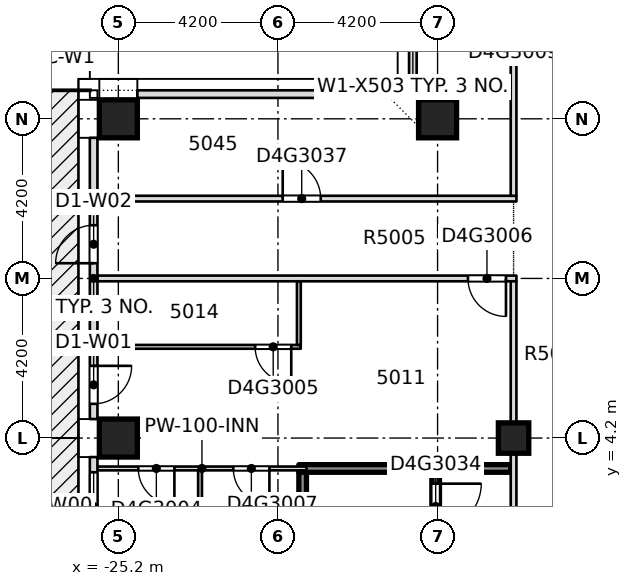
"""IFC4 building model, lengths in metres.
Left out: names, types, materials, properties, quantities, classifications, styles, units other than length and angle.
Written with IfcOpenShell. Run it as: python <this file> out.ifc"""

import sys

from ifc_helpers import new_model, si_unit, direction, frame, frame_2d, origin, origin_2d, place, context, subcontext, project, spatial, rectangle, extrude, element, fill, save


model = new_model("IFC4")
c1 = context("Model", 3, precision=1e-05, world=origin(), true_north=direction((0.0, 1.0)))
c2 = subcontext(c1, "Body", "Model", "MODEL_VIEW")
j1 = project(units=[si_unit("LENGTHUNIT", "METRE"), si_unit("PLANEANGLEUNIT", "RADIAN")], contexts=[c1])
p1 = place(None, origin())
s1 = spatial("IfcSite", under=j1, at=p1, CompositionType="ELEMENT")
p2 = place(p1, origin())
s2 = spatial("IfcBuilding", under=s1, at=p2, CompositionType="ELEMENT")
p3 = place(p2, frame((0.0, 0.0, 192.8)))
s3 = spatial("IfcBuildingStorey", under=s2, at=p3, CompositionType="ELEMENT", Elevation=192.8)
for number, where, z_axis, x_axis in (
    (1, (-25.2, 4.2, -0.4), (0.0, 0.0, 1.0), (1.0, 0.0, 0.0)),
    (2, (-25.2, 12.6, -0.4), (0.0, 0.0, 1.0), (1.0, 0.0, 0.0)),
    (3, (-16.8, 12.6, -0.4), (0.0, 0.0, 1.0), (1.0, 0.0, 0.0)),
):
    element("IfcColumn", number, at=place(p3, frame(where, z_axis=z_axis, x_axis=x_axis)), inside=s3, PredefinedType="COLUMN", context=c2, shape_type="SweptSolid", body=[
        extrude(rectangle(XDim=1.0, YDim=1.0, at=origin_2d()), origin(), (0.0, 0.0, 1.0), 3.45),
    ])
p4 = place(p3, frame((-14.8, 4.2, -0.4), z_axis=(0.0, 0.0, 1.0), x_axis=(1.0, 0.0, 0.0)))
e4 = element("IfcColumn", 4, at=p4, inside=s3, PredefinedType="COLUMN", context=c2, shape_type="SweptSolid", body=[
    extrude(rectangle(XDim=0.8, YDim=0.8, at=origin_2d()), origin(), (0.0, 0.0, 1.0), 3.45),
])
p5 = place(p3, frame((-25.75, 3.4, 0.0), z_axis=(0.0, 0.0, 1.0), x_axis=(1.0, 0.0, 0.0)))
e5 = element("IfcWall", 5, at=p5, inside=s3, PredefinedType="PARTITIONING", context=c2, shape_type="SweptSolid", body=[
    extrude(rectangle(XDim=5.5, YDim=0.1, at=frame_2d((2.75, 0.0))), origin(), (0.0, 0.0, 1.0), 3.05),
])
p6 = place(p5, frame((1.075, 0.0, 0.0)))
e6 = element("IfcOpeningElement", 6, at=p6, cuts=e5, PredefinedType="OPENING", context=c2, shape_type="SweptSolid", body=[
    extrude(rectangle(XDim=0.95, YDim=2.1, at=frame_2d((0.475, 1.05))), frame((0.0, 0.06, 0.0), z_axis=(0.0, -1.0, 0.0), x_axis=(1.0, 0.0, 0.0)), (0.0, 0.0, 1.0), 0.12),
])
p7 = place(p5, frame((3.575, 0.0, 0.0)))
e7 = element("IfcOpeningElement", 7, at=p7, cuts=e5, PredefinedType="OPENING", context=c2, shape_type="SweptSolid", body=[
    extrude(rectangle(XDim=0.95, YDim=2.1, at=frame_2d((0.475, 1.05))), frame((0.0, 0.06, 0.0), z_axis=(0.0, -1.0, 0.0), x_axis=(1.0, 0.0, 0.0)), (0.0, 0.0, 1.0), 0.12),
])
p8 = place(p3, frame((-20.45, 3.4, 0.0), z_axis=(0.0, 0.0, 1.0), x_axis=(1.0, 0.0, 0.0)))
e8 = element("IfcWall", 8, at=p8, inside=s3, PredefinedType="SOLIDWALL", context=c2, shape_type="SweptSolid", body=[
    extrude(rectangle(XDim=5.575, YDim=0.2, at=frame_2d((2.788, 0.0))), origin(), (0.0, 0.0, 1.0), 3.05),
])
p9 = place(p3, frame((-25.75, 6.6, 0.0), z_axis=(0.0, 0.0, 1.0), x_axis=(1.0, 0.0, 0.0)))
e9 = element("IfcWall", 9, at=p9, inside=s3, PredefinedType="PARTITIONING", context=c2, shape_type="SweptSolid", body=[
    extrude(rectangle(XDim=5.35, YDim=0.1, at=frame_2d((2.675, 0.0))), origin(), (0.0, 0.0, 1.0), 3.05),
])
p10 = place(p9, frame((4.15, 0.0, 0.0)))
e10 = element("IfcOpeningElement", 10, at=p10, cuts=e9, PredefinedType="OPENING", context=c2, shape_type="SweptSolid", body=[
    extrude(rectangle(XDim=0.95, YDim=2.1, at=frame_2d((0.475, 1.05))), frame((0.0, 0.06, 0.0), z_axis=(0.0, -1.0, 0.0), x_axis=(1.0, 0.0, 0.0)), (0.0, 0.0, 1.0), 0.12),
])
p11 = place(p3, frame((-25.75, 8.4, 0.0), z_axis=(0.0, 0.0, 1.0), x_axis=(1.0, 0.0, 0.0)))
e11 = element("IfcWall", 11, at=p11, inside=s3, PredefinedType="PARTITIONING", context=c2, shape_type="SweptSolid", body=[
    extrude(rectangle(XDim=11.025, YDim=0.15, at=frame_2d((5.512, 0.0))), origin(), (0.0, 0.0, 1.0), 3.05),
])
p12 = place(p11, frame((9.75, 0.0, 0.0)))
e12 = element("IfcOpeningElement", 12, at=p12, cuts=e11, PredefinedType="OPENING", context=c2, shape_type="SweptSolid", body=[
    extrude(rectangle(XDim=1.0, YDim=2.1, at=frame_2d((0.5, 1.05))), frame((0.0, 0.085, 0.0), z_axis=(0.0, -1.0, 0.0), x_axis=(1.0, 0.0, 0.0)), (0.0, 0.0, 1.0), 0.17),
])
p13 = place(p3, frame((-25.75, 10.5, 0.0), z_axis=(0.0, 0.0, 1.0), x_axis=(1.0, 0.0, 0.0)))
e13 = element("IfcWall", 13, at=p13, inside=s3, PredefinedType="PARTITIONING", context=c2, shape_type="SweptSolid", body=[
    extrude(rectangle(XDim=11.025, YDim=0.15, at=frame_2d((5.512, 0.0))), origin(), (0.0, 0.0, 1.0), 3.05),
])
p14 = place(p13, frame((4.875, 0.0, 0.0)))
e14 = element("IfcOpeningElement", 14, at=p14, cuts=e13, PredefinedType="OPENING", context=c2, shape_type="SweptSolid", body=[
    extrude(rectangle(XDim=1.0, YDim=2.1, at=frame_2d((0.5, 1.05))), frame((0.0, 0.085, 0.0), z_axis=(0.0, -1.0, 0.0), x_axis=(1.0, 0.0, 0.0)), (0.0, 0.0, 1.0), 0.17),
])
p15 = place(p3, frame((-17.35, 13.35, 0.0), z_axis=(0.0, 0.0, 1.0), x_axis=(1.0, 0.0, 0.0)))
e15 = element("IfcWall", 15, at=p15, inside=s3, PredefinedType="PARTITIONING", context=c2, shape_type="SweptSolid", body=[
    extrude(rectangle(XDim=2.475, YDim=0.2, at=frame_2d((1.238, 0.0))), origin(), (0.0, 0.0, 1.0), 3.05),
])
p16 = place(p3, frame((-23.05, -3.3, 0.0), z_axis=(0.0, 0.0, 1.0), x_axis=(0.0, 1.0, 0.0)))
e16 = element("IfcWall", 16, at=p16, inside=s3, PredefinedType="PARTITIONING", context=c2, shape_type="SweptSolid", body=[
    extrude(rectangle(XDim=6.65, YDim=0.1, at=frame_2d((3.325, 0.0))), origin(), (0.0, 0.0, 1.0), 3.05),
])
p17 = place(p3, frame((-20.45, 6.65, 0.0), z_axis=(0.0, 0.0, 1.0), x_axis=(0.0, 1.0, 0.0)))
e17 = element("IfcWall", 17, at=p17, inside=s3, PredefinedType="PARTITIONING", context=c2, shape_type="SweptSolid", body=[
    extrude(rectangle(XDim=1.675, YDim=0.1, at=frame_2d((0.837, 0.0))), origin(), (0.0, 0.0, 1.0), 3.05),
])
p18 = place(p3, frame((-20.35, -0.83, 0.0), z_axis=(0.0, 0.0, 1.0), x_axis=(0.0, 1.0, 0.0)))
e18 = element("IfcWall", 18, at=p18, inside=s3, PredefinedType="SOLIDWALL", context=c2, shape_type="SweptSolid", body=[
    extrude(rectangle(XDim=4.13, YDim=0.2, at=frame_2d((2.065, 0.0))), origin(), (0.0, 0.0, 1.0), 3.05),
])
p19 = place(p3, frame((-16.85, -3.35, 0.0), z_axis=(0.0, 0.0, 1.0), x_axis=(0.0, 1.0, 0.0)))
e19 = element("IfcWall", 19, at=p19, inside=s3, PredefinedType="SOLIDWALL", context=c2, shape_type="SweptSolid", body=[
    extrude(rectangle(XDim=6.65, YDim=0.2, at=frame_2d((3.325, 0.0))), origin(), (0.0, 0.0, 1.0), 3.05),
])
p20 = place(p19, frame((5.15, 0.0, 0.0)))
e20 = element("IfcOpeningElement", 20, at=p20, cuts=e19, PredefinedType="OPENING", context=c2, shape_type="SweptSolid", body=[
    extrude(rectangle(XDim=1.2, YDim=2.1, at=frame_2d((0.6, 1.05))), frame((0.0, 0.11, 0.0), z_axis=(0.0, -1.0, 0.0), x_axis=(1.0, 0.0, 0.0)), (0.0, 0.0, 1.0), 0.22),
])
p21 = place(p3, frame((-14.8, -3.35, 0.0), z_axis=(0.0, 0.0, 1.0), x_axis=(0.0, 1.0, 0.0)))
e21 = element("IfcWall", 21, at=p21, inside=s3, PredefinedType="PARTITIONING", context=c2, shape_type="SweptSolid", body=[
    extrude(rectangle(XDim=11.675, YDim=0.15, at=frame_2d((5.837, 0.0))), origin(), (0.0, 0.0, 1.0), 3.05),
])
p22 = place(p21, frame((2.8, 0.0, 0.0)))
e22 = element("IfcOpeningElement", 22, at=p22, cuts=e21, PredefinedType="OPENING", context=c2, shape_type="SweptSolid", body=[
    extrude(rectangle(XDim=1.1, YDim=2.1, at=frame_2d((0.55, 1.05))), frame((0.0, 0.085, 0.0), z_axis=(0.0, -1.0, 0.0), x_axis=(1.0, 0.0, 0.0)), (0.0, 0.0, 1.0), 0.17),
])
p23 = place(p3, frame((-14.8, 10.575, 0.0), z_axis=(0.0, 0.0, 1.0), x_axis=(0.0, 1.0, 0.0)))
e23 = element("IfcWall", 23, at=p23, inside=s3, PredefinedType="PARTITIONING", context=c2, shape_type="SweptSolid", body=[
    extrude(rectangle(XDim=10.975, YDim=0.15, at=frame_2d((5.488, 0.0))), origin(), (0.0, 0.0, 1.0), 3.05),
])
p24 = place(p23, frame((4.375, 0.0, 0.0)))
e24 = element("IfcOpeningElement", 24, at=p24, cuts=e23, PredefinedType="OPENING", context=c2, shape_type="SweptSolid", body=[
    extrude(rectangle(XDim=0.95, YDim=2.1, at=frame_2d((0.475, 1.05))), frame((0.0, 0.085, 0.0), z_axis=(0.0, -1.0, 0.0), x_axis=(1.0, 0.0, 0.0)), (0.0, 0.0, 1.0), 0.17),
])
p25 = place(p23, frame((8.275, 0.0, 0.0)))
e25 = element("IfcOpeningElement", 25, at=p25, cuts=e23, PredefinedType="OPENING", context=c2, shape_type="SweptSolid", body=[
    extrude(rectangle(XDim=0.95, YDim=2.1, at=frame_2d((0.475, 1.05))), frame((0.0, 0.085, 0.0), z_axis=(0.0, -1.0, 0.0), x_axis=(1.0, 0.0, 0.0)), (0.0, 0.0, 1.0), 0.17),
])
p26 = place(p3, frame((-17.45, 20.5, 0.0), z_axis=(0.0, 0.0, 1.0), x_axis=(0.0, -1.0, 0.0)))
e26 = element("IfcWall", 26, at=p26, inside=s3, PredefinedType="STANDARD", context=c2, shape_type="SweptSolid", body=[
    extrude(rectangle(XDim=7.15, YDim=0.2, at=frame_2d((3.575, 0.0))), origin(), (0.0, 0.0, 1.0), 3.05),
])
p27 = place(p26, frame((3.975, 0.0, 0.2)))
e27 = element("IfcOpeningElement", 27, at=p27, cuts=e26, PredefinedType="OPENING", context=c2, shape_type="SweptSolid", body=[
    extrude(rectangle(XDim=1.8, YDim=2.65, at=frame_2d((0.9, 1.325))), frame((0.0, 0.11, 0.0), z_axis=(0.0, -1.0, 0.0), x_axis=(1.0, 0.0, 0.0)), (0.0, 0.0, 1.0), 0.22),
])
p28 = place(p26, frame((0.4, 0.0, 0.2)))
e28 = element("IfcOpeningElement", 28, at=p28, cuts=e26, PredefinedType="OPENING", context=c2, shape_type="SweptSolid", body=[
    extrude(rectangle(XDim=1.8, YDim=2.65, at=frame_2d((0.9, 1.325))), frame((0.0, 0.11, 0.0), z_axis=(0.0, -1.0, 0.0), x_axis=(1.0, 0.0, 0.0)), (0.0, 0.0, 1.0), 0.22),
])
p29 = place(p3, frame((-17.55, 13.25, 0.0), z_axis=(0.0, 0.0, 1.0), x_axis=(-1.0, 0.0, 0.0)))
e29 = element("IfcWall", 29, at=p29, inside=s3, PredefinedType="STANDARD", context=c2, shape_type="SweptSolid", body=[
    extrude(rectangle(XDim=7.15, YDim=0.2, at=frame_2d((3.575, 0.0))), origin(), (0.0, 0.0, 1.0), 3.05),
])
p30 = place(p3, frame((-25.85, 12.1, 0.0), z_axis=(0.0, 0.0, 1.0), x_axis=(0.0, -1.0, 0.0)))
e30 = element("IfcWall", 30, at=p30, inside=s3, PredefinedType="STANDARD", context=c2, shape_type="SweptSolid", body=[
    extrude(rectangle(XDim=7.4, YDim=0.2, at=frame_2d((3.7, 0.0))), origin(), (0.0, 0.0, 1.0), 3.05),
])
p31 = place(p30, frame((6.0, 0.0, 0.0)))
e31 = element("IfcOpeningElement", 31, at=p31, cuts=e30, PredefinedType="OPENING", context=c2, shape_type="SweptSolid", body=[
    extrude(rectangle(XDim=1.0, YDim=2.4, at=frame_2d((0.5, 1.2))), frame((0.0, 0.11, 0.0), z_axis=(0.0, -1.0, 0.0), x_axis=(1.0, 0.0, 0.0)), (0.0, 0.0, 1.0), 0.22),
])
p32 = place(p30, frame((2.3, 0.0, 0.0)))
e32 = element("IfcOpeningElement", 32, at=p32, cuts=e30, PredefinedType="OPENING", context=c2, shape_type="SweptSolid", body=[
    extrude(rectangle(XDim=1.0, YDim=2.4, at=frame_2d((0.5, 1.2))), frame((0.0, 0.11, 0.0), z_axis=(0.0, -1.0, 0.0), x_axis=(1.0, 0.0, 0.0)), (0.0, 0.0, 1.0), 0.22),
])
p33 = place(p3, frame((-25.85, 3.7, 0.0), z_axis=(0.0, 0.0, 1.0), x_axis=(0.0, -1.0, 0.0)))
e33 = element("IfcWall", 33, at=p33, inside=s3, PredefinedType="STANDARD", context=c2, shape_type="SweptSolid", body=[
    extrude(rectangle(XDim=7.4, YDim=0.2, at=frame_2d((3.7, 0.0))), origin(), (0.0, 0.0, 1.0), 3.05),
])
p34 = place(p33, frame((4.1, 0.0, 0.2)))
e34 = element("IfcOpeningElement", 34, at=p34, cuts=e33, PredefinedType="OPENING", context=c2, shape_type="SweptSolid", body=[
    extrude(rectangle(XDim=1.8, YDim=2.65, at=frame_2d((0.9, 1.325))), frame((0.0, 0.11, 0.0), z_axis=(0.0, -1.0, 0.0), x_axis=(1.0, 0.0, 0.0)), (0.0, 0.0, 1.0), 0.22),
])
p35 = place(p33, frame((6.0, 0.0, 0.0)))
e35 = element("IfcOpeningElement", 35, at=p35, cuts=e33, PredefinedType="OPENING", context=c2, shape_type="SweptSolid", body=[
    extrude(rectangle(XDim=1.0, YDim=2.4, at=frame_2d((0.5, 1.2))), frame((0.0, 0.11, 0.0), z_axis=(0.0, -1.0, 0.0), x_axis=(1.0, 0.0, 0.0)), (0.0, 0.0, 1.0), 0.22),
])
p36 = place(p33, frame((0.4, 0.0, 0.2)))
e36 = element("IfcOpeningElement", 36, at=p36, cuts=e33, PredefinedType="OPENING", context=c2, shape_type="SweptSolid", body=[
    extrude(rectangle(XDim=1.8, YDim=2.65, at=frame_2d((0.9, 1.325))), frame((0.0, 0.11, 0.0), z_axis=(0.0, -1.0, 0.0), x_axis=(1.0, 0.0, 0.0)), (0.0, 0.0, 1.0), 0.22),
])
p37 = place(p33, frame((2.3, 0.0, 0.0)))
e37 = element("IfcOpeningElement", 37, at=p37, cuts=e33, PredefinedType="OPENING", context=c2, shape_type="SweptSolid", body=[
    extrude(rectangle(XDim=1.0, YDim=2.4, at=frame_2d((0.5, 1.2))), frame((0.0, 0.11, 0.0), z_axis=(0.0, -1.0, 0.0), x_axis=(1.0, 0.0, 0.0)), (0.0, 0.0, 1.0), 0.22),
])
p38 = place(p6, origin())
e38 = element("IfcDoor", 38, at=p38, inside=s3, OperationType="SINGLE_SWING_RIGHT", PredefinedType="DOOR", context=c2, shape_type="SweptSolid", body=[
    extrude(rectangle(XDim=0.95, YDim=2.1, at=frame_2d((0.475, 1.05))), frame((0.0, 0.025, 0.0), z_axis=(0.0, -1.0, 0.0), x_axis=(1.0, 0.0, 0.0)), (0.0, 0.0, 1.0), 0.05),
])
fill(e6, e38)
p39 = place(p10, origin())
e39 = element("IfcDoor", 39, at=p39, inside=s3, OperationType="SINGLE_SWING_LEFT", PredefinedType="DOOR", context=c2, shape_type="SweptSolid", body=[
    extrude(rectangle(XDim=0.95, YDim=2.1, at=frame_2d((0.475, 1.05))), frame((0.0, 0.025, 0.0), z_axis=(0.0, -1.0, 0.0), x_axis=(1.0, 0.0, 0.0)), (0.0, 0.0, 1.0), 0.05),
])
fill(e10, e39)
p40 = place(p12, origin())
e40 = element("IfcDoor", 40, at=p40, inside=s3, OperationType="SINGLE_SWING_RIGHT", PredefinedType="DOOR", context=c2, shape_type="SweptSolid", body=[
    extrude(rectangle(XDim=1.0, YDim=2.1, at=frame_2d((0.5, 1.05))), frame((0.0, 0.025, 0.0), z_axis=(0.0, -1.0, 0.0), x_axis=(1.0, 0.0, 0.0)), (0.0, 0.0, 1.0), 0.05),
])
fill(e12, e40)
p41 = place(p7, origin())
e41 = element("IfcDoor", 41, at=p41, inside=s3, OperationType="SINGLE_SWING_RIGHT", PredefinedType="DOOR", context=c2, shape_type="SweptSolid", body=[
    extrude(rectangle(XDim=0.95, YDim=2.1, at=frame_2d((0.475, 1.05))), frame((0.0, 0.025, 0.0), z_axis=(0.0, -1.0, 0.0), x_axis=(1.0, 0.0, 0.0)), (0.0, 0.0, 1.0), 0.05),
])
fill(e7, e41)
p42 = place(p20, origin())
e42 = element("IfcDoor", 42, at=p42, inside=s3, OperationType="SINGLE_SWING_RIGHT", PredefinedType="DOOR", context=c2, shape_type="SweptSolid", body=[
    extrude(rectangle(XDim=1.2, YDim=2.1, at=frame_2d((0.6, 1.05))), frame((0.0, 0.025, 0.0), z_axis=(0.0, -1.0, 0.0), x_axis=(1.0, 0.0, 0.0)), (0.0, 0.0, 1.0), 0.05),
])
fill(e20, e42)
p43 = place(p14, origin())
e43 = element("IfcDoor", 43, at=p43, inside=s3, OperationType="SINGLE_SWING_RIGHT", PredefinedType="DOOR", context=c2, shape_type="SweptSolid", body=[
    extrude(rectangle(XDim=1.0, YDim=2.1, at=frame_2d((0.5, 1.05))), frame((0.0, 0.025, 0.0), z_axis=(0.0, -1.0, 0.0), x_axis=(1.0, 0.0, 0.0)), (0.0, 0.0, 1.0), 0.05),
])
fill(e14, e43)
p44 = place(p31, origin())
e44 = element("IfcDoor", 44, at=p44, inside=s3, OperationType="SINGLE_SWING_LEFT", PredefinedType="DOOR", context=c2, shape_type="SweptSolid", body=[
    extrude(rectangle(XDim=1.0, YDim=2.4, at=frame_2d((0.5, 1.2))), frame((0.0, 0.025, 0.0), z_axis=(0.0, -1.0, 0.0), x_axis=(1.0, 0.0, 0.0)), (0.0, 0.0, 1.0), 0.05),
])
fill(e31, e44)
p45 = place(p32, origin())
e45 = element("IfcDoor", 45, at=p45, inside=s3, OperationType="SINGLE_SWING_LEFT", PredefinedType="DOOR", context=c2, shape_type="SweptSolid", body=[
    extrude(rectangle(XDim=1.0, YDim=2.4, at=frame_2d((0.5, 1.2))), frame((0.0, 0.025, 0.0), z_axis=(0.0, -1.0, 0.0), x_axis=(1.0, 0.0, 0.0)), (0.0, 0.0, 1.0), 0.05),
])
fill(e32, e45)
p46 = place(p36, origin())
e46 = element("IfcWindow", 46, at=p46, inside=s3, PartitioningType="SINGLE_PANEL", PredefinedType="WINDOW", context=c2, shape_type="SweptSolid", body=[
    extrude(rectangle(XDim=1.8, YDim=2.65, at=frame_2d((0.9, 1.325))), frame((0.0, 0.03, 0.0), z_axis=(0.0, -1.0, 0.0), x_axis=(1.0, 0.0, 0.0)), (0.0, 0.0, 1.0), 0.06),
])
fill(e36, e46)
save(model, sys.argv[1])
